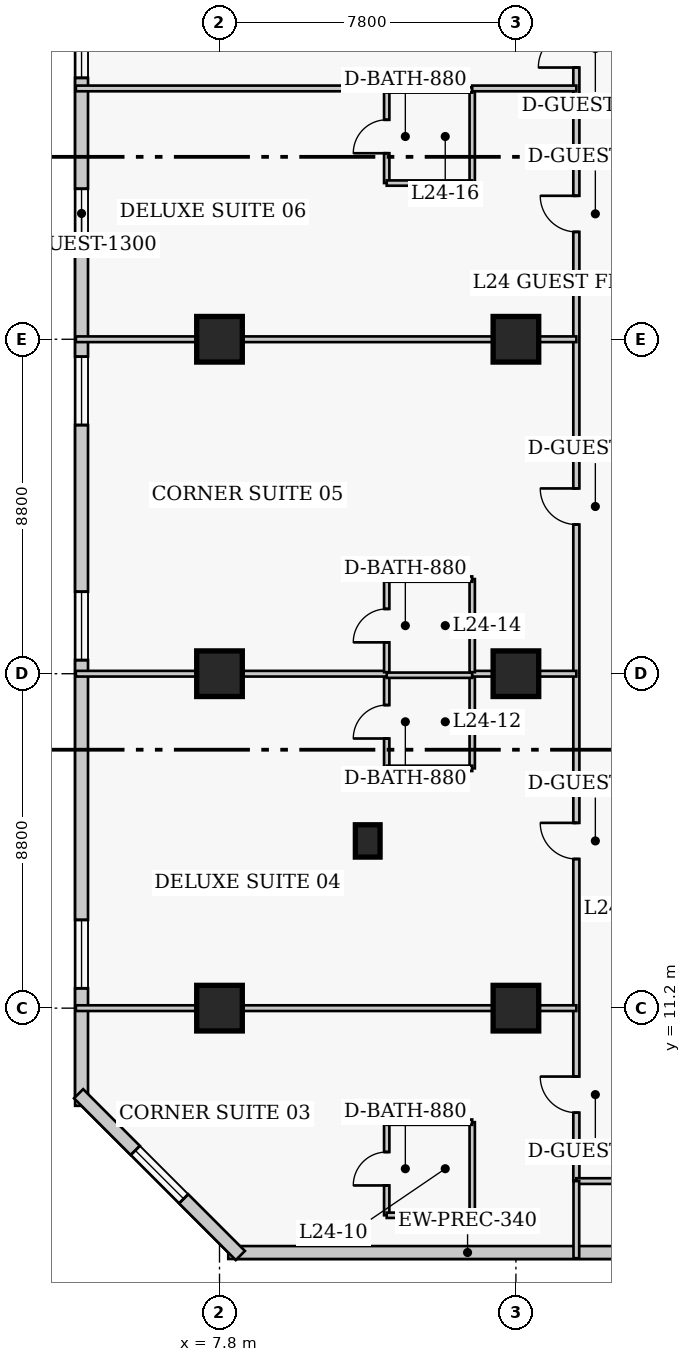
"""IFC4 building model, lengths in metres.
Left out: names, types, materials, properties, quantities, classifications, styles, units other than length and angle.
Written with IfcOpenShell. Run it as: python <this file> out.ifc"""

import sys

from ifc_helpers import new_model, si_unit, direction, frame, frame_2d, origin, origin_2d, place, context, subcontext, project, spatial, rectangle, extrude, element, fill, save


model = new_model("IFC4")
c1 = context("Model", 3, precision=1e-05, world=origin(), true_north=direction((0.0, 1.0)))
c2 = subcontext(c1, "Body", "Model", "MODEL_VIEW")
j1 = project(units=[si_unit("LENGTHUNIT", "METRE"), si_unit("PLANEANGLEUNIT", "RADIAN")], contexts=[c1])
p1 = place(None, origin())
s1 = spatial("IfcSite", under=j1, at=p1, CompositionType="ELEMENT")
p2 = place(p1, origin())
s2 = spatial("IfcBuilding", under=s1, at=p2, CompositionType="ELEMENT")
p3 = place(p2, frame((0.0, 0.0, 99.4)))
s3 = spatial("IfcBuildingStorey", under=s2, at=p3, CompositionType="ELEMENT", Elevation=99.4)
for number, where, z_axis, x_axis in (
    (1, (7.8, 11.2, 0.0), (0.0, 0.0, 1.0), (1.0, 0.0, 0.0)),
    (2, (7.8, 20.0, 0.0), (0.0, 0.0, 1.0), (1.0, 0.0, 0.0)),
    (3, (7.8, 28.8, 0.0), (0.0, 0.0, 1.0), (1.0, 0.0, 0.0)),
    (4, (15.6, 11.2, 0.0), (0.0, 0.0, 1.0), (1.0, 0.0, 0.0)),
    (5, (15.6, 20.0, 0.0), (0.0, 0.0, 1.0), (1.0, 0.0, 0.0)),
    (6, (15.6, 28.8, 0.0), (0.0, 0.0, 1.0), (1.0, 0.0, 0.0)),
):
    element("IfcColumn", number, at=place(p3, frame(where, z_axis=z_axis, x_axis=x_axis)), inside=s3, PredefinedType="COLUMN", context=c2, shape_type="SweptSolid", body=[
        extrude(rectangle(XDim=1.2, YDim=1.2, at=origin_2d()), origin(), (0.0, 0.0, 1.0), 3.8),
    ])
p4 = place(p3, frame((11.7, 15.6, 0.0), z_axis=(0.0, 0.0, 1.0), x_axis=(1.0, 0.0, 0.0)))
e7 = element("IfcColumn", 7, at=p4, inside=s3, PredefinedType="PILASTER", context=c2, shape_type="SweptSolid", body=[
    extrude(rectangle(XDim=0.65, YDim=0.85, at=origin_2d()), origin(), (0.0, 0.0, 1.0), 3.8),
])
p5 = place(p3, frame((8.03, 4.77, 0.0), z_axis=(0.0, 0.0, 1.0), x_axis=(1.0, 0.0, 0.0)))
e8 = element("IfcWall", 8, at=p5, inside=s3, PredefinedType="SOLIDWALL", context=c2, shape_type="SweptSolid", body=[
    extrude(rectangle(XDim=28.29, YDim=0.34, at=frame_2d((14.145, 0.0))), origin(), (0.0, 0.0, 1.0), 3.54),
])
p6 = place(p5, frame((17.82, 0.0, 0.0)))
e9 = element("IfcOpeningElement", 9, at=p6, cuts=e8, PredefinedType="OPENING", context=c2, shape_type="SweptSolid", body=[
    extrude(rectangle(XDim=1.4, YDim=2.15, at=frame_2d((0.7, 1.075))), frame((0.0, 0.18, 0.0), z_axis=(0.0, -1.0, 0.0), x_axis=(1.0, 0.0, 0.0)), (0.0, 0.0, 1.0), 0.36),
])
p7 = place(p5, frame((12.595, 0.0, 0.85)))
e10 = element("IfcOpeningElement", 10, at=p7, cuts=e8, PredefinedType="OPENING", context=c2, shape_type="SweptSolid", body=[
    extrude(rectangle(XDim=1.8, YDim=1.8, at=frame_2d((0.9, 0.9))), frame((0.0, 0.18, 0.0), z_axis=(0.0, -1.0, 0.0), x_axis=(1.0, 0.0, 0.0)), (0.0, 0.0, 1.0), 0.36),
])
p8 = place(p3, frame((4.17, 40.57, 0.0), z_axis=(0.0, 0.0, 1.0), x_axis=(0.0, -1.0, 0.0)))
e11 = element("IfcWall", 11, at=p8, inside=s3, PredefinedType="SOLIDWALL", context=c2, shape_type="SweptSolid", body=[
    extrude(rectangle(XDim=31.94, YDim=0.34, at=frame_2d((15.97, 0.0))), origin(), (0.0, 0.0, 1.0), 3.54),
])
p9 = place(p8, frame((3.093, 0.0, 0.85)))
e12 = element("IfcOpeningElement", 12, at=p9, cuts=e11, PredefinedType="OPENING", context=c2, shape_type="SweptSolid", body=[
    extrude(rectangle(XDim=1.8, YDim=1.8, at=frame_2d((0.9, 0.9))), frame((0.0, 0.18, 0.0), z_axis=(0.0, -1.0, 0.0), x_axis=(1.0, 0.0, 0.0)), (0.0, 0.0, 1.0), 0.36),
])
p10 = place(p8, frame((12.228, 0.0, 0.85)))
e13 = element("IfcOpeningElement", 13, at=p10, cuts=e11, PredefinedType="OPENING", context=c2, shape_type="SweptSolid", body=[
    extrude(rectangle(XDim=1.8, YDim=1.8, at=frame_2d((0.9, 0.9))), frame((0.0, 0.18, 0.0), z_axis=(0.0, -1.0, 0.0), x_axis=(1.0, 0.0, 0.0)), (0.0, 0.0, 1.0), 0.36),
])
p11 = place(p8, frame((18.413, 0.0, 0.85)))
e14 = element("IfcOpeningElement", 14, at=p11, cuts=e11, PredefinedType="OPENING", context=c2, shape_type="SweptSolid", body=[
    extrude(rectangle(XDim=1.8, YDim=1.8, at=frame_2d((0.9, 0.9))), frame((0.0, 0.18, 0.0), z_axis=(0.0, -1.0, 0.0), x_axis=(1.0, 0.0, 0.0)), (0.0, 0.0, 1.0), 0.36),
])
p12 = place(p8, frame((27.048, 0.0, 0.85)))
e15 = element("IfcOpeningElement", 15, at=p12, cuts=e11, PredefinedType="OPENING", context=c2, shape_type="SweptSolid", body=[
    extrude(rectangle(XDim=1.8, YDim=1.8, at=frame_2d((0.9, 0.9))), frame((0.0, 0.18, 0.0), z_axis=(0.0, -1.0, 0.0), x_axis=(1.0, 0.0, 0.0)), (0.0, 0.0, 1.0), 0.36),
])
p13 = place(p8, frame((7.81, 0.0, 0.85)))
e16 = element("IfcOpeningElement", 16, at=p13, cuts=e11, PredefinedType="OPENING", context=c2, shape_type="SweptSolid", body=[
    extrude(rectangle(XDim=1.3, YDim=1.7, at=frame_2d((0.65, 0.85))), frame((0.0, 0.18, 0.0), z_axis=(0.0, -1.0, 0.0), x_axis=(1.0, 0.0, 0.0)), (0.0, 0.0, 1.0), 0.36),
])
p14 = place(p3, frame((4.092, 8.948, 0.0), z_axis=(0.0, 0.0, 1.0), x_axis=(0.707106781187, -0.707106781187, 0.0)))
e17 = element("IfcWall", 17, at=p14, inside=s3, PredefinedType="SOLIDWALL", context=c2, shape_type="SweptSolid", body=[
    extrude(rectangle(XDim=6.02, YDim=0.34, at=frame_2d((3.01, 0.0))), origin(), (0.0, 0.0, 1.0), 3.54),
])
p15 = place(p14, frame((2.11, 0.0, 0.85)))
e18 = element("IfcOpeningElement", 18, at=p15, cuts=e17, PredefinedType="OPENING", context=c2, shape_type="SweptSolid", body=[
    extrude(rectangle(XDim=1.8, YDim=1.8, at=frame_2d((0.9, 0.9))), frame((0.0, 0.18, 0.0), z_axis=(0.0, -1.0, 0.0), x_axis=(1.0, 0.0, 0.0)), (0.0, 0.0, 1.0), 0.36),
])
p16 = place(p3, frame((17.19, 6.65, 0.0), z_axis=(0.0, 0.0, 1.0), x_axis=(0.0, 1.0, 0.0)))
e19 = element("IfcWall", 19, at=p16, inside=s3, PredefinedType="PARTITIONING", context=c2, shape_type="SweptSolid", body=[
    extrude(rectangle(XDim=34.0, YDim=0.16, at=frame_2d((17.0, 0.0))), origin(), (0.0, 0.0, 1.0), 3.54),
])
p17 = place(p16, frame((1.8, 0.0, 0.0)))
e20 = element("IfcOpeningElement", 20, at=p17, cuts=e19, PredefinedType="OPENING", context=c2, shape_type="SweptSolid", body=[
    extrude(rectangle(XDim=0.95, YDim=2.1, at=frame_2d((0.475, 1.05))), frame((0.0, 0.09, 0.0), z_axis=(0.0, -1.0, 0.0), x_axis=(1.0, 0.0, 0.0)), (0.0, 0.0, 1.0), 0.18),
])
p18 = place(p16, frame((8.475, 0.0, 0.0)))
e21 = element("IfcOpeningElement", 21, at=p18, cuts=e19, PredefinedType="OPENING", context=c2, shape_type="SweptSolid", body=[
    extrude(rectangle(XDim=0.95, YDim=2.1, at=frame_2d((0.475, 1.05))), frame((0.0, 0.09, 0.0), z_axis=(0.0, -1.0, 0.0), x_axis=(1.0, 0.0, 0.0)), (0.0, 0.0, 1.0), 0.18),
])
p19 = place(p16, frame((17.275, 0.0, 0.0)))
e22 = element("IfcOpeningElement", 22, at=p19, cuts=e19, PredefinedType="OPENING", context=c2, shape_type="SweptSolid", body=[
    extrude(rectangle(XDim=0.95, YDim=2.1, at=frame_2d((0.475, 1.05))), frame((0.0, 0.09, 0.0), z_axis=(0.0, -1.0, 0.0), x_axis=(1.0, 0.0, 0.0)), (0.0, 0.0, 1.0), 0.18),
])
p20 = place(p16, frame((24.975, 0.0, 0.0)))
e23 = element("IfcOpeningElement", 23, at=p20, cuts=e19, PredefinedType="OPENING", context=c2, shape_type="SweptSolid", body=[
    extrude(rectangle(XDim=0.95, YDim=2.1, at=frame_2d((0.475, 1.05))), frame((0.0, 0.09, 0.0), z_axis=(0.0, -1.0, 0.0), x_axis=(1.0, 0.0, 0.0)), (0.0, 0.0, 1.0), 0.18),
])
p21 = place(p16, frame((29.3, 0.0, 0.0)))
e24 = element("IfcOpeningElement", 24, at=p21, cuts=e19, PredefinedType="OPENING", context=c2, shape_type="SweptSolid", body=[
    extrude(rectangle(XDim=1.0, YDim=2.15, at=frame_2d((0.5, 1.075))), frame((0.0, 0.09, 0.0), z_axis=(0.0, -1.0, 0.0), x_axis=(1.0, 0.0, 0.0)), (0.0, 0.0, 1.0), 0.18),
])
p22 = place(p3, frame((17.19, 6.65, 0.0), z_axis=(0.0, 0.0, 1.0), x_axis=(1.0, 0.0, 0.0)))
e25 = element("IfcWall", 25, at=p22, inside=s3, PredefinedType="PARTITIONING", context=c2, shape_type="SweptSolid", body=[
    extrude(rectangle(XDim=2.22, YDim=0.15, at=frame_2d((1.11, 0.0))), origin(), (0.0, 0.0, 1.0), 3.54),
])
p23 = place(p3, frame((17.19, 4.62, 0.0), z_axis=(0.0, 0.0, 1.0), x_axis=(0.0, 1.0, 0.0)))
e26 = element("IfcWall", 26, at=p23, inside=s3, PredefinedType="PARTITIONING", context=c2, shape_type="SweptSolid", body=[
    extrude(rectangle(XDim=2.03, YDim=0.15, at=frame_2d((1.015, 0.0))), origin(), (0.0, 0.0, 1.0), 3.54),
])
p24 = place(p3, frame((12.2, 5.75, 0.0), z_axis=(0.0, 0.0, 1.0), x_axis=(0.0, 1.0, 0.0)))
e27 = element("IfcWall", 27, at=p24, inside=s3, PredefinedType="PLUMBINGWALL", context=c2, shape_type="SweptSolid", body=[
    extrude(rectangle(XDim=2.45, YDim=0.14, at=frame_2d((1.225, 0.0))), origin(), (0.0, 0.0, 1.0), 3.54),
])
p25 = place(p24, frame((0.785, 0.0, 0.0)))
e28 = element("IfcOpeningElement", 28, at=p25, cuts=e27, PredefinedType="OPENING", context=c2, shape_type="SweptSolid", body=[
    extrude(rectangle(XDim=0.88, YDim=2.05, at=frame_2d((0.44, 1.025))), frame((0.0, 0.08, 0.0), z_axis=(0.0, -1.0, 0.0), x_axis=(1.0, 0.0, 0.0)), (0.0, 0.0, 1.0), 0.16),
])
p26 = place(p3, frame((14.45, 5.75, 0.0), z_axis=(0.0, 0.0, 1.0), x_axis=(0.0, 1.0, 0.0)))
e29 = element("IfcWall", 29, at=p26, inside=s3, PredefinedType="PLUMBINGWALL", context=c2, shape_type="SweptSolid", body=[
    extrude(rectangle(XDim=2.45, YDim=0.14, at=frame_2d((1.225, 0.0))), origin(), (0.0, 0.0, 1.0), 3.54),
])
for number, where, z_axis, x_axis in (
    (30, (12.2, 5.75, 0.0), (0.0, 0.0, 1.0), (1.0, 0.0, 0.0)),
    (31, (12.2, 8.2, 0.0), (0.0, 0.0, 1.0), (1.0, 0.0, 0.0)),
):
    element("IfcWall", number, at=place(p3, frame(where, z_axis=z_axis, x_axis=x_axis)), inside=s3, PredefinedType="PLUMBINGWALL", context=c2, shape_type="SweptSolid", body=[
        extrude(rectangle(XDim=2.25, YDim=0.14, at=frame_2d((1.125, 0.0))), origin(), (0.0, 0.0, 1.0), 3.54),
    ])
p27 = place(p3, frame((4.02, 11.2, 0.0), z_axis=(0.0, 0.0, 1.0), x_axis=(1.0, 0.0, 0.0)))
e32 = element("IfcWall", 32, at=p27, inside=s3, PredefinedType="PARTITIONING", context=c2, shape_type="SweptSolid", body=[
    extrude(rectangle(XDim=13.17, YDim=0.15, at=frame_2d((6.585, 0.0))), origin(), (0.0, 0.0, 1.0), 2.679),
])
p28 = place(p3, frame((12.2, 17.51, 0.0), z_axis=(0.0, 0.0, 1.0), x_axis=(0.0, 1.0, 0.0)))
e33 = element("IfcWall", 33, at=p28, inside=s3, PredefinedType="PLUMBINGWALL", context=c2, shape_type="SweptSolid", body=[
    extrude(rectangle(XDim=2.45, YDim=0.14, at=frame_2d((1.225, 0.0))), origin(), (0.0, 0.0, 1.0), 3.54),
])
p29 = place(p28, frame((0.785, 0.0, 0.0)))
e34 = element("IfcOpeningElement", 34, at=p29, cuts=e33, PredefinedType="OPENING", context=c2, shape_type="SweptSolid", body=[
    extrude(rectangle(XDim=0.88, YDim=2.05, at=frame_2d((0.44, 1.025))), frame((0.0, 0.08, 0.0), z_axis=(0.0, -1.0, 0.0), x_axis=(1.0, 0.0, 0.0)), (0.0, 0.0, 1.0), 0.16),
])
p30 = place(p3, frame((14.45, 17.51, 0.0), z_axis=(0.0, 0.0, 1.0), x_axis=(0.0, 1.0, 0.0)))
e35 = element("IfcWall", 35, at=p30, inside=s3, PredefinedType="PLUMBINGWALL", context=c2, shape_type="SweptSolid", body=[
    extrude(rectangle(XDim=2.45, YDim=0.14, at=frame_2d((1.225, 0.0))), origin(), (0.0, 0.0, 1.0), 3.54),
])
p31 = place(p3, frame((12.2, 17.51, 0.0), z_axis=(0.0, 0.0, 1.0), x_axis=(1.0, 0.0, 0.0)))
e36 = element("IfcWall", 36, at=p31, inside=s3, PredefinedType="PLUMBINGWALL", context=c2, shape_type="SweptSolid", body=[
    extrude(rectangle(XDim=2.25, YDim=0.14, at=frame_2d((1.125, 0.0))), origin(), (0.0, 0.0, 1.0), 3.54),
])
p32 = place(p3, frame((12.2, 19.96, 0.0), z_axis=(0.0, 0.0, 1.0), x_axis=(1.0, 0.0, 0.0)))
e37 = element("IfcWall", 37, at=p32, inside=s3, PredefinedType="PLUMBINGWALL", context=c2, shape_type="SweptSolid", body=[
    extrude(rectangle(XDim=2.25, YDim=0.14, at=frame_2d((1.125, 0.0))), origin(), (0.0, 0.0, 1.0), 2.679),
])
p33 = place(p3, frame((4.02, 20.0, 0.0), z_axis=(0.0, 0.0, 1.0), x_axis=(1.0, 0.0, 0.0)))
e38 = element("IfcWall", 38, at=p33, inside=s3, PredefinedType="PARTITIONING", context=c2, shape_type="SweptSolid", body=[
    extrude(rectangle(XDim=8.18, YDim=0.15, at=frame_2d((4.09, 0.0))), origin(), (0.0, 0.0, 1.0), 2.679),
])
p34 = place(p3, frame((14.45, 20.0, 0.0), z_axis=(0.0, 0.0, 1.0), x_axis=(1.0, 0.0, 0.0)))
e39 = element("IfcWall", 39, at=p34, inside=s3, PredefinedType="PARTITIONING", context=c2, shape_type="SweptSolid", body=[
    extrude(rectangle(XDim=2.74, YDim=0.15, at=frame_2d((1.37, 0.0))), origin(), (0.0, 0.0, 1.0), 2.679),
])
p35 = place(p3, frame((12.2, 20.04, 0.0), z_axis=(0.0, 0.0, 1.0), x_axis=(0.0, 1.0, 0.0)))
e40 = element("IfcWall", 40, at=p35, inside=s3, PredefinedType="PLUMBINGWALL", context=c2, shape_type="SweptSolid", body=[
    extrude(rectangle(XDim=2.45, YDim=0.14, at=frame_2d((1.225, 0.0))), origin(), (0.0, 0.0, 1.0), 3.54),
])
p36 = place(p35, frame((0.785, 0.0, 0.0)))
e41 = element("IfcOpeningElement", 41, at=p36, cuts=e40, PredefinedType="OPENING", context=c2, shape_type="SweptSolid", body=[
    extrude(rectangle(XDim=0.88, YDim=2.05, at=frame_2d((0.44, 1.025))), frame((0.0, 0.08, 0.0), z_axis=(0.0, -1.0, 0.0), x_axis=(1.0, 0.0, 0.0)), (0.0, 0.0, 1.0), 0.16),
])
p37 = place(p3, frame((14.45, 20.04, 0.0), z_axis=(0.0, 0.0, 1.0), x_axis=(0.0, 1.0, 0.0)))
e42 = element("IfcWall", 42, at=p37, inside=s3, PredefinedType="PLUMBINGWALL", context=c2, shape_type="SweptSolid", body=[
    extrude(rectangle(XDim=2.45, YDim=0.14, at=frame_2d((1.225, 0.0))), origin(), (0.0, 0.0, 1.0), 3.54),
])
p38 = place(p3, frame((12.2, 22.49, 0.0), z_axis=(0.0, 0.0, 1.0), x_axis=(1.0, 0.0, 0.0)))
e43 = element("IfcWall", 43, at=p38, inside=s3, PredefinedType="PLUMBINGWALL", context=c2, shape_type="SweptSolid", body=[
    extrude(rectangle(XDim=2.25, YDim=0.14, at=frame_2d((1.125, 0.0))), origin(), (0.0, 0.0, 1.0), 3.54),
])
p39 = place(p3, frame((4.02, 28.8, 0.0), z_axis=(0.0, 0.0, 1.0), x_axis=(1.0, 0.0, 0.0)))
e44 = element("IfcWall", 44, at=p39, inside=s3, PredefinedType="PARTITIONING", context=c2, shape_type="SweptSolid", body=[
    extrude(rectangle(XDim=13.17, YDim=0.15, at=frame_2d((6.585, 0.0))), origin(), (0.0, 0.0, 1.0), 2.679),
])
p40 = place(p3, frame((12.2, 32.91, 0.0), z_axis=(0.0, 0.0, 1.0), x_axis=(0.0, 1.0, 0.0)))
e45 = element("IfcWall", 45, at=p40, inside=s3, PredefinedType="PLUMBINGWALL", context=c2, shape_type="SweptSolid", body=[
    extrude(rectangle(XDim=2.45, YDim=0.14, at=frame_2d((1.225, 0.0))), origin(), (0.0, 0.0, 1.0), 3.54),
])
p41 = place(p40, frame((0.785, 0.0, 0.0)))
e46 = element("IfcOpeningElement", 46, at=p41, cuts=e45, PredefinedType="OPENING", context=c2, shape_type="SweptSolid", body=[
    extrude(rectangle(XDim=0.88, YDim=2.05, at=frame_2d((0.44, 1.025))), frame((0.0, 0.08, 0.0), z_axis=(0.0, -1.0, 0.0), x_axis=(1.0, 0.0, 0.0)), (0.0, 0.0, 1.0), 0.16),
])
p42 = place(p3, frame((14.45, 32.91, 0.0), z_axis=(0.0, 0.0, 1.0), x_axis=(0.0, 1.0, 0.0)))
e47 = element("IfcWall", 47, at=p42, inside=s3, PredefinedType="PLUMBINGWALL", context=c2, shape_type="SweptSolid", body=[
    extrude(rectangle(XDim=2.45, YDim=0.14, at=frame_2d((1.225, 0.0))), origin(), (0.0, 0.0, 1.0), 3.54),
])
for number, where, z_axis, x_axis in (
    (48, (12.2, 32.91, 0.0), (0.0, 0.0, 1.0), (1.0, 0.0, 0.0)),
    (49, (12.2, 35.36, 0.0), (0.0, 0.0, 1.0), (1.0, 0.0, 0.0)),
):
    element("IfcWall", number, at=place(p3, frame(where, z_axis=z_axis, x_axis=x_axis)), inside=s3, PredefinedType="PLUMBINGWALL", context=c2, shape_type="SweptSolid", body=[
        extrude(rectangle(XDim=2.25, YDim=0.14, at=frame_2d((1.125, 0.0))), origin(), (0.0, 0.0, 1.0), 3.54),
    ])
p43 = place(p3, frame((4.02, 35.4, 0.0), z_axis=(0.0, 0.0, 1.0), x_axis=(1.0, 0.0, 0.0)))
e50 = element("IfcWall", 50, at=p43, inside=s3, PredefinedType="PARTITIONING", context=c2, shape_type="SweptSolid", body=[
    extrude(rectangle(XDim=8.18, YDim=0.15, at=frame_2d((4.09, 0.0))), origin(), (0.0, 0.0, 1.0), 3.54),
])
p44 = place(p3, frame((14.45, 35.4, 0.0), z_axis=(0.0, 0.0, 1.0), x_axis=(1.0, 0.0, 0.0)))
e51 = element("IfcWall", 51, at=p44, inside=s3, PredefinedType="PARTITIONING", context=c2, shape_type="SweptSolid", body=[
    extrude(rectangle(XDim=2.74, YDim=0.15, at=frame_2d((1.37, 0.0))), origin(), (0.0, 0.0, 1.0), 3.54),
])
p45 = place(p9, origin())
e52 = element("IfcWindow", 52, at=p45, inside=s3, PartitioningType="SINGLE_PANEL", PredefinedType="WINDOW", context=c2, shape_type="SweptSolid", body=[
    extrude(rectangle(XDim=1.8, YDim=1.8, at=frame_2d((0.9, 0.9))), frame((0.0, 0.03, 0.0), z_axis=(0.0, -1.0, 0.0), x_axis=(1.0, 0.0, 0.0)), (0.0, 0.0, 1.0), 0.06),
])
fill(e12, e52)
p46 = place(p10, origin())
e53 = element("IfcWindow", 53, at=p46, inside=s3, PartitioningType="SINGLE_PANEL", PredefinedType="WINDOW", context=c2, shape_type="SweptSolid", body=[
    extrude(rectangle(XDim=1.8, YDim=1.8, at=frame_2d((0.9, 0.9))), frame((0.0, 0.03, 0.0), z_axis=(0.0, -1.0, 0.0), x_axis=(1.0, 0.0, 0.0)), (0.0, 0.0, 1.0), 0.06),
])
fill(e13, e53)
p47 = place(p11, origin())
e54 = element("IfcWindow", 54, at=p47, inside=s3, PartitioningType="SINGLE_PANEL", PredefinedType="WINDOW", context=c2, shape_type="SweptSolid", body=[
    extrude(rectangle(XDim=1.8, YDim=1.8, at=frame_2d((0.9, 0.9))), frame((0.0, 0.03, 0.0), z_axis=(0.0, -1.0, 0.0), x_axis=(1.0, 0.0, 0.0)), (0.0, 0.0, 1.0), 0.06),
])
fill(e14, e54)
p48 = place(p12, origin())
e55 = element("IfcWindow", 55, at=p48, inside=s3, PartitioningType="SINGLE_PANEL", PredefinedType="WINDOW", context=c2, shape_type="SweptSolid", body=[
    extrude(rectangle(XDim=1.8, YDim=1.8, at=frame_2d((0.9, 0.9))), frame((0.0, 0.03, 0.0), z_axis=(0.0, -1.0, 0.0), x_axis=(1.0, 0.0, 0.0)), (0.0, 0.0, 1.0), 0.06),
])
fill(e15, e55)
p49 = place(p15, origin())
e56 = element("IfcWindow", 56, at=p49, inside=s3, PartitioningType="SINGLE_PANEL", PredefinedType="WINDOW", context=c2, shape_type="SweptSolid", body=[
    extrude(rectangle(XDim=1.8, YDim=1.8, at=frame_2d((0.9, 0.9))), frame((0.0, 0.03, 0.0), z_axis=(0.0, -1.0, 0.0), x_axis=(1.0, 0.0, 0.0)), (0.0, 0.0, 1.0), 0.06),
])
fill(e18, e56)
p50 = place(p13, origin())
e57 = element("IfcWindow", 57, at=p50, inside=s3, PartitioningType="SINGLE_PANEL", PredefinedType="WINDOW", context=c2, shape_type="SweptSolid", body=[
    extrude(rectangle(XDim=1.3, YDim=1.7, at=frame_2d((0.65, 0.85))), frame((0.0, 0.03, 0.0), z_axis=(0.0, -1.0, 0.0), x_axis=(1.0, 0.0, 0.0)), (0.0, 0.0, 1.0), 0.06),
])
fill(e16, e57)
p51 = place(p25, origin())
e58 = element("IfcDoor", 58, at=p51, inside=s3, OperationType="SINGLE_SWING_LEFT", PredefinedType="DOOR", context=c2, shape_type="SweptSolid", body=[
    extrude(rectangle(XDim=0.88, YDim=2.05, at=frame_2d((0.44, 1.025))), frame((0.0, 0.025, 0.0), z_axis=(0.0, -1.0, 0.0), x_axis=(1.0, 0.0, 0.0)), (0.0, 0.0, 1.0), 0.05),
])
fill(e28, e58)
p52 = place(p17, origin())
e59 = element("IfcDoor", 59, at=p52, inside=s3, OperationType="SINGLE_SWING_RIGHT", PredefinedType="DOOR", context=c2, shape_type="SweptSolid", body=[
    extrude(rectangle(XDim=0.95, YDim=2.1, at=frame_2d((0.475, 1.05))), frame((0.0, 0.025, 0.0), z_axis=(0.0, -1.0, 0.0), x_axis=(1.0, 0.0, 0.0)), (0.0, 0.0, 1.0), 0.05),
])
fill(e20, e59)
p53 = place(p29, origin())
e60 = element("IfcDoor", 60, at=p53, inside=s3, OperationType="SINGLE_SWING_LEFT", PredefinedType="DOOR", context=c2, shape_type="SweptSolid", body=[
    extrude(rectangle(XDim=0.88, YDim=2.05, at=frame_2d((0.44, 1.025))), frame((0.0, 0.025, 0.0), z_axis=(0.0, -1.0, 0.0), x_axis=(1.0, 0.0, 0.0)), (0.0, 0.0, 1.0), 0.05),
])
fill(e34, e60)
p54 = place(p18, origin())
e61 = element("IfcDoor", 61, at=p54, inside=s3, OperationType="SINGLE_SWING_RIGHT", PredefinedType="DOOR", context=c2, shape_type="SweptSolid", body=[
    extrude(rectangle(XDim=0.95, YDim=2.1, at=frame_2d((0.475, 1.05))), frame((0.0, 0.025, 0.0), z_axis=(0.0, -1.0, 0.0), x_axis=(1.0, 0.0, 0.0)), (0.0, 0.0, 1.0), 0.05),
])
fill(e21, e61)
p55 = place(p36, origin())
e62 = element("IfcDoor", 62, at=p55, inside=s3, OperationType="SINGLE_SWING_LEFT", PredefinedType="DOOR", context=c2, shape_type="SweptSolid", body=[
    extrude(rectangle(XDim=0.88, YDim=2.05, at=frame_2d((0.44, 1.025))), frame((0.0, 0.025, 0.0), z_axis=(0.0, -1.0, 0.0), x_axis=(1.0, 0.0, 0.0)), (0.0, 0.0, 1.0), 0.05),
])
fill(e41, e62)
p56 = place(p19, origin())
e63 = element("IfcDoor", 63, at=p56, inside=s3, OperationType="SINGLE_SWING_RIGHT", PredefinedType="DOOR", context=c2, shape_type="SweptSolid", body=[
    extrude(rectangle(XDim=0.95, YDim=2.1, at=frame_2d((0.475, 1.05))), frame((0.0, 0.025, 0.0), z_axis=(0.0, -1.0, 0.0), x_axis=(1.0, 0.0, 0.0)), (0.0, 0.0, 1.0), 0.05),
])
fill(e22, e63)
p57 = place(p41, origin())
e64 = element("IfcDoor", 64, at=p57, inside=s3, OperationType="SINGLE_SWING_LEFT", PredefinedType="DOOR", context=c2, shape_type="SweptSolid", body=[
    extrude(rectangle(XDim=0.88, YDim=2.05, at=frame_2d((0.44, 1.025))), frame((0.0, 0.025, 0.0), z_axis=(0.0, -1.0, 0.0), x_axis=(1.0, 0.0, 0.0)), (0.0, 0.0, 1.0), 0.05),
])
fill(e46, e64)
p58 = place(p20, origin())
e65 = element("IfcDoor", 65, at=p58, inside=s3, OperationType="SINGLE_SWING_RIGHT", PredefinedType="DOOR", context=c2, shape_type="SweptSolid", body=[
    extrude(rectangle(XDim=0.95, YDim=2.1, at=frame_2d((0.475, 1.05))), frame((0.0, 0.025, 0.0), z_axis=(0.0, -1.0, 0.0), x_axis=(1.0, 0.0, 0.0)), (0.0, 0.0, 1.0), 0.05),
])
fill(e23, e65)
p59 = place(p21, origin())
e66 = element("IfcDoor", 66, at=p59, inside=s3, OperationType="SINGLE_SWING_LEFT", PredefinedType="DOOR", context=c2, shape_type="SweptSolid", body=[
    extrude(rectangle(XDim=1.0, YDim=2.15, at=frame_2d((0.5, 1.075))), frame((0.0, 0.025, 0.0), z_axis=(0.0, -1.0, 0.0), x_axis=(1.0, 0.0, 0.0)), (0.0, 0.0, 1.0), 0.05),
])
fill(e24, e66)
save(model, sys.argv[1])
